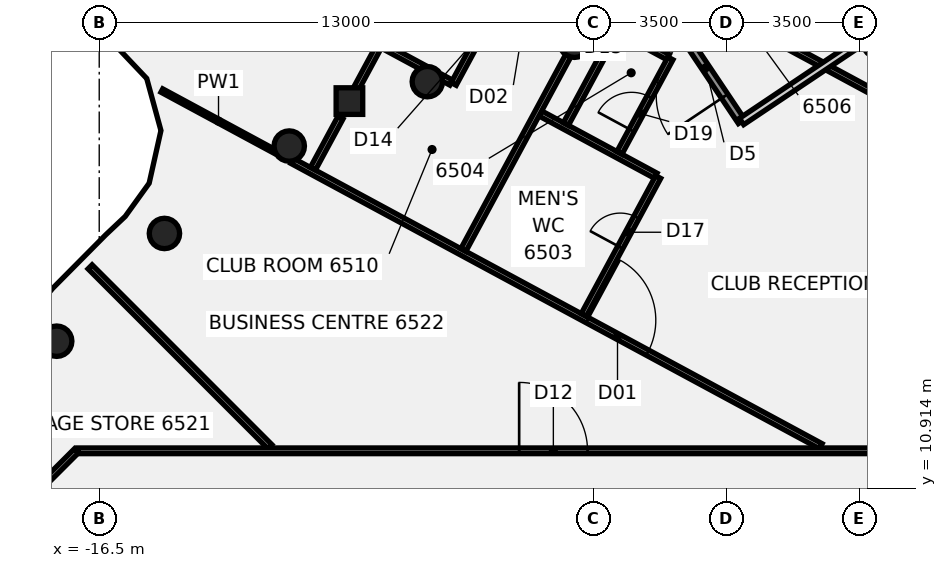
"""IFC4 building model, lengths in metres.
Left out: names, types, materials, properties, quantities, classifications, styles, units other than length and angle.
Written with IfcOpenShell. Run it as: python <this file> out.ifc"""

import sys

from ifc_helpers import new_model, si_unit, direction, frame, frame_2d, origin, origin_2d, place, context, subcontext, project, spatial, rectangle, circle, extrude, element, fill, save


model = new_model("IFC4")
c1 = context("Model", 3, precision=1e-05, world=origin(), true_north=direction((0.0, 1.0)))
c2 = subcontext(c1, "Body", "Model", "MODEL_VIEW")
j1 = project(units=[si_unit("LENGTHUNIT", "METRE"), si_unit("PLANEANGLEUNIT", "RADIAN")], contexts=[c1])
p1 = place(None, origin())
s1 = spatial("IfcSite", under=j1, at=p1, CompositionType="ELEMENT")
p2 = place(p1, origin())
s2 = spatial("IfcBuilding", under=s1, at=p2, CompositionType="ELEMENT")
p3 = place(p2, frame((0.0, 0.0, 256.8)))
s3 = spatial("IfcBuildingStorey", under=s2, at=p3, CompositionType="ELEMENT", Elevation=256.8)
for number, where, z_axis, x_axis in (
    (1, (3.994, 22.651, -0.14), (0.0, 0.0, 1.0), (1.0, 0.0, 0.0)),
    (2, (-3.994, 22.651, -0.14), (0.0, 0.0, 1.0), (1.0, 0.0, 0.0)),
    (3, (-7.866, 21.613, -0.14), (0.0, 0.0, 1.0), (1.0, 0.0, 0.0)),
    (4, (-11.5, 19.919, -0.14), (0.0, 0.0, 1.0), (1.0, 0.0, 0.0)),
    (5, (-14.784, 17.619, -0.14), (0.0, 0.0, 1.0), (1.0, 0.0, 0.0)),
    (6, (-17.619, 14.784, -0.14), (0.0, 0.0, 1.0), (1.0, 0.0, 0.0)),
):
    element("IfcColumn", number, at=place(p3, frame(where, z_axis=z_axis, x_axis=x_axis)), inside=s3, PredefinedType="COLUMN", context=c2, shape_type="SweptSolid", body=[
        extrude(circle(Radius=0.4, at=origin_2d()), origin(), (0.0, 0.0, 1.0), 3.6),
    ])
p4 = place(p3, frame((-9.916, 21.102, -0.136), z_axis=(0.004951262933, -0.050123059005, 0.998730776512), x_axis=(0.47590217516, 0.878507663673, 0.041730139536)))
e7 = element("IfcColumn", 7, at=p4, inside=s3, PredefinedType="COLUMN", context=c2, shape_type="SweptSolid", body=[
    extrude(rectangle(XDim=0.7, YDim=0.7, at=origin_2d()), origin(), (0.0, 0.0, 1.0), 3.6),
])
p5 = place(p3, frame((-16.74, 16.74, 0.0), z_axis=(0.0, 0.0, 1.0), x_axis=(0.707106781187, -0.707106781187, 0.0)))
e8 = element("IfcWall", 8, at=p5, inside=s3, PredefinedType="PARTITIONING", context=c2, shape_type="SweptSolid", body=[
    extrude(rectangle(XDim=6.691, YDim=0.15, at=frame_2d((3.345, 0.0))), origin(), (0.0, 0.0, 1.0), 2.864),
])
p6 = place(p3, frame((-14.852, 21.379, 0.0), z_axis=(0.0, 0.0, 1.0), x_axis=(0.880026474936, -0.47492462919, 0.0)))
e9 = element("IfcWall", 9, at=p6, inside=s3, PredefinedType="PARTITIONING", context=c2, shape_type="SweptSolid", body=[
    extrude(rectangle(XDim=3.388, YDim=0.1, at=frame_2d((1.694, 0.0))), origin(), (0.0, 0.0, 1.0), 2.864),
])
p7 = place(p3, frame((-11.424, 19.529, 0.0), z_axis=(0.0, 0.0, 1.0), x_axis=(0.880009979756, -0.474955193181, 0.0)))
e10 = element("IfcWall", 10, at=p7, inside=s3, PredefinedType="PARTITIONING", context=c2, shape_type="SweptSolid", body=[
    extrude(rectangle(XDim=15.808, YDim=0.15, at=frame_2d((7.904, 0.0))), origin(), (0.0, 0.0, 1.0), 2.864),
])
p8 = place(p7, frame((8.829, 0.0, 0.0)))
e11 = element("IfcOpeningElement", 11, at=p8, cuts=e10, PredefinedType="OPENING", context=c2, shape_type="SweptSolid", body=[
    extrude(rectangle(XDim=1.8, YDim=2.1, at=frame_2d((0.9, 1.05))), frame((0.0, 0.085, 0.0), z_axis=(0.0, -1.0, 0.0), x_axis=(1.0, 0.0, 0.0)), (0.0, 0.0, 1.0), 0.17),
])
p9 = place(p3, frame((-9.043, 22.562, 0.0), z_axis=(0.0, 0.0, 1.0), x_axis=(0.879935954221, -0.475092324153, 0.0)))
e12 = element("IfcWall", 12, at=p9, inside=s3, PredefinedType="PARTITIONING", context=c2, shape_type="SweptSolid", body=[
    extrude(rectangle(XDim=1.202, YDim=0.15, at=frame_2d((0.601, 0.0))), origin(), (0.0, 0.0, 1.0), 2.864),
])
p10 = place(p3, frame((-7.486, 21.722, 0.0), z_axis=(0.0, 0.0, 1.0), x_axis=(0.880051073949, -0.474879044854, 0.0)))
e13 = element("IfcWall", 13, at=p10, inside=s3, PredefinedType="PARTITIONING", context=c2, shape_type="SweptSolid", body=[
    extrude(rectangle(XDim=0.28, YDim=0.15, at=frame_2d((0.14, 0.0))), origin(), (0.0, 0.0, 1.0), 2.864),
])
p11 = place(p3, frame((-4.893, 20.777, 0.0), z_axis=(0.0, 0.0, 1.0), x_axis=(0.880007149788, -0.474960436586, 0.0)))
e14 = element("IfcWall", 14, at=p11, inside=s3, PredefinedType="PARTITIONING", context=c2, shape_type="SweptSolid", body=[
    extrude(rectangle(XDim=3.45, YDim=0.15, at=frame_2d((1.725, 0.0))), origin(), (0.0, 0.0, 1.0), 2.864),
])
p12 = place(p3, frame((-2.86, 22.976, 0.0), z_axis=(0.0, 0.0, 1.0), x_axis=(0.880085616352, -0.474815024921, 0.0)))
e15 = element("IfcWall", 15, at=p12, inside=s3, PredefinedType="PARTITIONING", context=c2, shape_type="SweptSolid", body=[
    extrude(rectangle(XDim=1.506, YDim=0.15, at=frame_2d((0.753, 0.0))), origin(), (0.0, 0.0, 1.0), 2.864),
])
p13 = place(p3, frame((0.302, 23.258, 0.0), z_axis=(0.0, 0.0, 1.0), x_axis=(0.88000876601, -0.474957442037, 0.0)))
e16 = element("IfcWall", 16, at=p13, inside=s3, PredefinedType="PARTITIONING", context=c2, shape_type="SweptSolid", body=[
    extrude(rectangle(XDim=14.256, YDim=0.15, at=frame_2d((7.128, 0.0))), origin(), (0.0, 0.0, 1.0), 2.864),
])
p14 = place(p13, frame((4.8, 0.0, 0.0)))
e17 = element("IfcOpeningElement", 17, at=p14, cuts=e16, PredefinedType="OPENING", context=c2, shape_type="SweptSolid", body=[
    extrude(rectangle(XDim=0.9, YDim=2.1, at=frame_2d((0.45, 1.05))), frame((0.0, 0.085, 0.0), z_axis=(0.0, -1.0, 0.0), x_axis=(1.0, 0.0, 0.0)), (0.0, 0.0, 1.0), 0.17),
])
p15 = place(p3, frame((-17.065, 11.9, 0.0), z_axis=(0.0, 0.0, 1.0), x_axis=(1.0, 0.0, 0.0)))
e18 = element("IfcWall", 18, at=p15, inside=s3, PredefinedType="PARTITIONING", context=c2, shape_type="SweptSolid", body=[
    extrude(rectangle(XDim=34.165, YDim=0.15, at=frame_2d((17.083, 0.0))), origin(), (0.0, 0.0, 1.0), 2.864),
])
p16 = place(p15, frame((22.777, 0.0, 0.0)))
e19 = element("IfcOpeningElement", 19, at=p16, cuts=e18, PredefinedType="OPENING", context=c2, shape_type="SweptSolid", body=[
    extrude(rectangle(XDim=1.8, YDim=2.1, at=frame_2d((0.9, 1.05))), frame((0.0, 0.085, 0.0), z_axis=(0.0, -1.0, 0.0), x_axis=(1.0, 0.0, 0.0)), (0.0, 0.0, 1.0), 0.17),
])
p17 = place(p15, frame((31.665, 0.0, 0.0)))
e20 = element("IfcOpeningElement", 20, at=p17, cuts=e18, PredefinedType="OPENING", context=c2, shape_type="SweptSolid", body=[
    extrude(rectangle(XDim=0.9, YDim=2.1, at=frame_2d((0.45, 1.05))), frame((0.0, 0.085, 0.0), z_axis=(0.0, -1.0, 0.0), x_axis=(1.0, 0.0, 0.0)), (0.0, 0.0, 1.0), 0.17),
])
p18 = place(p15, frame((11.615, 0.0, 0.0)))
e21 = element("IfcOpeningElement", 21, at=p18, cuts=e18, PredefinedType="OPENING", context=c2, shape_type="SweptSolid", body=[
    extrude(rectangle(XDim=1.8, YDim=2.1, at=frame_2d((0.9, 1.05))), frame((0.0, 0.085, 0.0), z_axis=(0.0, -1.0, 0.0), x_axis=(1.0, 0.0, 0.0)), (0.0, 0.0, 1.0), 0.17),
])
p19 = place(p3, frame((-18.872, 10.128, 0.0), z_axis=(0.0, 0.0, 1.0), x_axis=(0.707106781187, 0.707106781187, 0.0)))
e22 = element("IfcWall", 22, at=p19, inside=s3, PredefinedType="PARTITIONING", context=c2, shape_type="SweptSolid", body=[
    extrude(rectangle(XDim=2.505, YDim=0.15, at=frame_2d((1.253, 0.0))), origin(), (0.0, 0.0, 1.0), 2.864),
])
p20 = place(p3, frame((-10.876, 19.324, 0.0), z_axis=(0.0, 0.0, 1.0), x_axis=(0.474948327348, 0.880013685319, 0.0)))
e23 = element("IfcWall", 23, at=p20, inside=s3, PredefinedType="PARTITIONING", context=c2, shape_type="SweptSolid", body=[
    extrude(rectangle(XDim=1.527, YDim=0.15, at=frame_2d((0.763, 0.0))), origin(), (0.0, 0.0, 1.0), 2.864),
])
p21 = place(p3, frame((-9.755, 21.401, 0.0), z_axis=(0.0, 0.0, 1.0), x_axis=(0.47500714936, 0.87998193621, 0.0)))
e24 = element("IfcWall", 24, at=p21, inside=s3, PredefinedType="PARTITIONING", context=c2, shape_type="SweptSolid", body=[
    extrude(rectangle(XDim=6.32, YDim=0.15, at=frame_2d((3.16, 0.0))), origin(), (0.0, 0.0, 1.0), 2.864),
])
p22 = place(p21, frame((4.11, 0.0, 0.0)))
e25 = element("IfcOpeningElement", 25, at=p22, cuts=e24, PredefinedType="OPENING", context=c2, shape_type="SweptSolid", body=[
    extrude(rectangle(XDim=1.8, YDim=2.1, at=frame_2d((0.9, 1.05))), frame((0.0, 0.085, 0.0), z_axis=(0.0, -1.0, 0.0), x_axis=(1.0, 0.0, 0.0)), (0.0, 0.0, 1.0), 0.17),
])
p23 = place(p3, frame((-7.173, 21.553, 0.0), z_axis=(0.0, 0.0, 1.0), x_axis=(0.475033626328, 0.879967643642, 0.0)))
e26 = element("IfcWall", 26, at=p23, inside=s3, PredefinedType="PARTITIONING", context=c2, shape_type="SweptSolid", body=[
    extrude(rectangle(XDim=2.525, YDim=0.15, at=frame_2d((1.262, 0.0))), origin(), (0.0, 0.0, 1.0), 2.864),
])
p24 = place(p23, frame((1.05, 0.0, 0.0)))
e27 = element("IfcOpeningElement", 27, at=p24, cuts=e26, PredefinedType="OPENING", context=c2, shape_type="SweptSolid", body=[
    extrude(rectangle(XDim=0.9, YDim=2.1, at=frame_2d((0.45, 1.05))), frame((0.0, 0.085, 0.0), z_axis=(0.0, -1.0, 0.0), x_axis=(1.0, 0.0, 0.0)), (0.0, 0.0, 1.0), 0.17),
])
p25 = place(p3, frame((-6.918, 17.183, 0.0), z_axis=(0.0, 0.0, 1.0), x_axis=(0.475010414469, 0.879980173723, 0.0)))
e28 = element("IfcWall", 28, at=p25, inside=s3, PredefinedType="PARTITIONING", context=c2, shape_type="SweptSolid", body=[
    extrude(rectangle(XDim=5.978, YDim=0.15, at=frame_2d((2.989, 0.0))), origin(), (0.0, 0.0, 1.0), 2.864),
])
p26 = place(p3, frame((-4.219, 20.499, 0.0), z_axis=(0.0, 0.0, 1.0), x_axis=(0.47489329303, 0.880043385428, 0.0)))
e29 = element("IfcWall", 29, at=p26, inside=s3, PredefinedType="PARTITIONING", context=c2, shape_type="SweptSolid", body=[
    extrude(rectangle(XDim=2.825, YDim=0.15, at=frame_2d((1.413, 0.0))), origin(), (0.0, 0.0, 1.0), 2.864),
])
p27 = place(p3, frame((-3.75, 15.473, 0.0), z_axis=(0.0, 0.0, 1.0), x_axis=(0.474999530937, 0.879986048531, 0.0)))
e30 = element("IfcWall", 30, at=p27, inside=s3, PredefinedType="PARTITIONING", context=c2, shape_type="SweptSolid", body=[
    extrude(rectangle(XDim=4.125, YDim=0.15, at=frame_2d((2.062, 0.0))), origin(), (0.0, 0.0, 1.0), 2.864),
])
p28 = place(p27, frame((2.025, 0.0, 0.0)))
e31 = element("IfcOpeningElement", 31, at=p28, cuts=e30, PredefinedType="OPENING", context=c2, shape_type="SweptSolid", body=[
    extrude(rectangle(XDim=0.9, YDim=2.1, at=frame_2d((0.45, 1.05))), frame((0.0, 0.085, 0.0), z_axis=(0.0, -1.0, 0.0), x_axis=(1.0, 0.0, 0.0)), (0.0, 0.0, 1.0), 0.17),
])
p29 = place(p3, frame((-2.811, 19.739, 0.0), z_axis=(0.0, 0.0, 1.0), x_axis=(0.475094053196, 0.879935020679, 0.0)))
e32 = element("IfcWall", 32, at=p29, inside=s3, PredefinedType="PARTITIONING", context=c2, shape_type="SweptSolid", body=[
    extrude(rectangle(XDim=2.825, YDim=0.15, at=frame_2d((1.413, 0.0))), origin(), (0.0, 0.0, 1.0), 2.864),
])
p30 = place(p29, frame((0.675, 0.0, 0.0)))
e33 = element("IfcOpeningElement", 33, at=p30, cuts=e32, PredefinedType="OPENING", context=c2, shape_type="SweptSolid", body=[
    extrude(rectangle(XDim=1.0, YDim=2.1, at=frame_2d((0.5, 1.05))), frame((0.0, 0.085, 0.0), z_axis=(0.0, -1.0, 0.0), x_axis=(1.0, 0.0, 0.0)), (0.0, 0.0, 1.0), 0.17),
])
p31 = place(p3, frame((0.403, 20.565, 0.0), z_axis=(0.0, 0.0, 1.0), x_axis=(-0.55638015725, 0.830927867278, 0.0)))
e34 = element("IfcWall", 34, at=p31, inside=s3, PredefinedType="SOLIDWALL", context=c2, shape_type="SweptSolid", body=[
    extrude(rectangle(XDim=3.653, YDim=0.2, at=frame_2d((1.827, 0.0))), origin(), (0.0, 0.0, 1.0), 2.964),
])
p32 = place(p31, frame((0.8, 0.0, 0.0)))
e35 = element("IfcOpeningElement", 35, at=p32, cuts=e34, PredefinedType="OPENING", context=c2, shape_type="SweptSolid", body=[
    extrude(rectangle(XDim=1.8, YDim=2.4, at=frame_2d((0.9, 1.2))), frame((0.0, 0.11, 0.0), z_axis=(0.0, -1.0, 0.0), x_axis=(1.0, 0.0, 0.0)), (0.0, 0.0, 1.0), 0.22),
])
p33 = place(p3, frame((0.403, 20.565, 0.0), z_axis=(0.0, 0.0, 1.0), x_axis=(0.830933103282, 0.556372337441, 0.0)))
e36 = element("IfcWall", 36, at=p33, inside=s3, PredefinedType="SOLIDWALL", context=c2, shape_type="SweptSolid", body=[
    extrude(rectangle(XDim=5.286, YDim=0.2, at=frame_2d((2.643, 0.0))), origin(), (0.0, 0.0, 1.0), 3.46),
])
p34 = place(p8, origin())
e37 = element("IfcDoor", 37, at=p34, inside=s3, OperationType="DOUBLE_DOOR_SINGLE_SWING", PredefinedType="DOOR", context=c2, shape_type="SweptSolid", body=[
    extrude(rectangle(XDim=1.8, YDim=2.1, at=frame_2d((0.9, 1.05))), frame((0.0, 0.025, 0.0), z_axis=(0.0, -1.0, 0.0), x_axis=(1.0, 0.0, 0.0)), (0.0, 0.0, 1.0), 0.05),
])
fill(e11, e37)
p35 = place(p18, frame((1.8, 0.0, 0.0), z_axis=(0.0, 0.0, 1.0), x_axis=(-1.0, 0.0, 0.0)))
e38 = element("IfcDoor", 38, at=p35, inside=s3, OperationType="DOUBLE_DOOR_SINGLE_SWING", PredefinedType="DOOR", context=c2, shape_type="SweptSolid", body=[
    extrude(rectangle(XDim=1.8, YDim=2.1, at=frame_2d((0.9, 1.05))), frame((0.0, 0.025, 0.0), z_axis=(0.0, -1.0, 0.0), x_axis=(1.0, 0.0, 0.0)), (0.0, 0.0, 1.0), 0.05),
])
fill(e21, e38)
p36 = place(p28, origin())
e39 = element("IfcDoor", 39, at=p36, inside=s3, OperationType="SINGLE_SWING_LEFT", PredefinedType="DOOR", context=c2, shape_type="SweptSolid", body=[
    extrude(rectangle(XDim=0.9, YDim=2.1, at=frame_2d((0.45, 1.05))), frame((0.0, 0.025, 0.0), z_axis=(0.0, -1.0, 0.0), x_axis=(1.0, 0.0, 0.0)), (0.0, 0.0, 1.0), 0.05),
])
fill(e31, e39)
p37 = place(p30, origin())
e40 = element("IfcDoor", 40, at=p37, inside=s3, OperationType="SINGLE_SWING_RIGHT", PredefinedType="DOOR", context=c2, shape_type="SweptSolid", body=[
    extrude(rectangle(XDim=1.0, YDim=2.1, at=frame_2d((0.5, 1.05))), frame((0.0, 0.025, 0.0), z_axis=(0.0, -1.0, 0.0), x_axis=(1.0, 0.0, 0.0)), (0.0, 0.0, 1.0), 0.05),
])
fill(e33, e40)
p38 = place(p32, origin())
e41 = element("IfcDoor", 41, at=p38, inside=s3, OperationType="SINGLE_SWING_LEFT", PredefinedType="DOOR", context=c2, shape_type="SweptSolid", body=[
    extrude(rectangle(XDim=1.8, YDim=2.4, at=frame_2d((0.9, 1.2))), frame((0.0, 0.025, 0.0), z_axis=(0.0, -1.0, 0.0), x_axis=(1.0, 0.0, 0.0)), (0.0, 0.0, 1.0), 0.05),
])
fill(e35, e41)
save(model, sys.argv[1])
